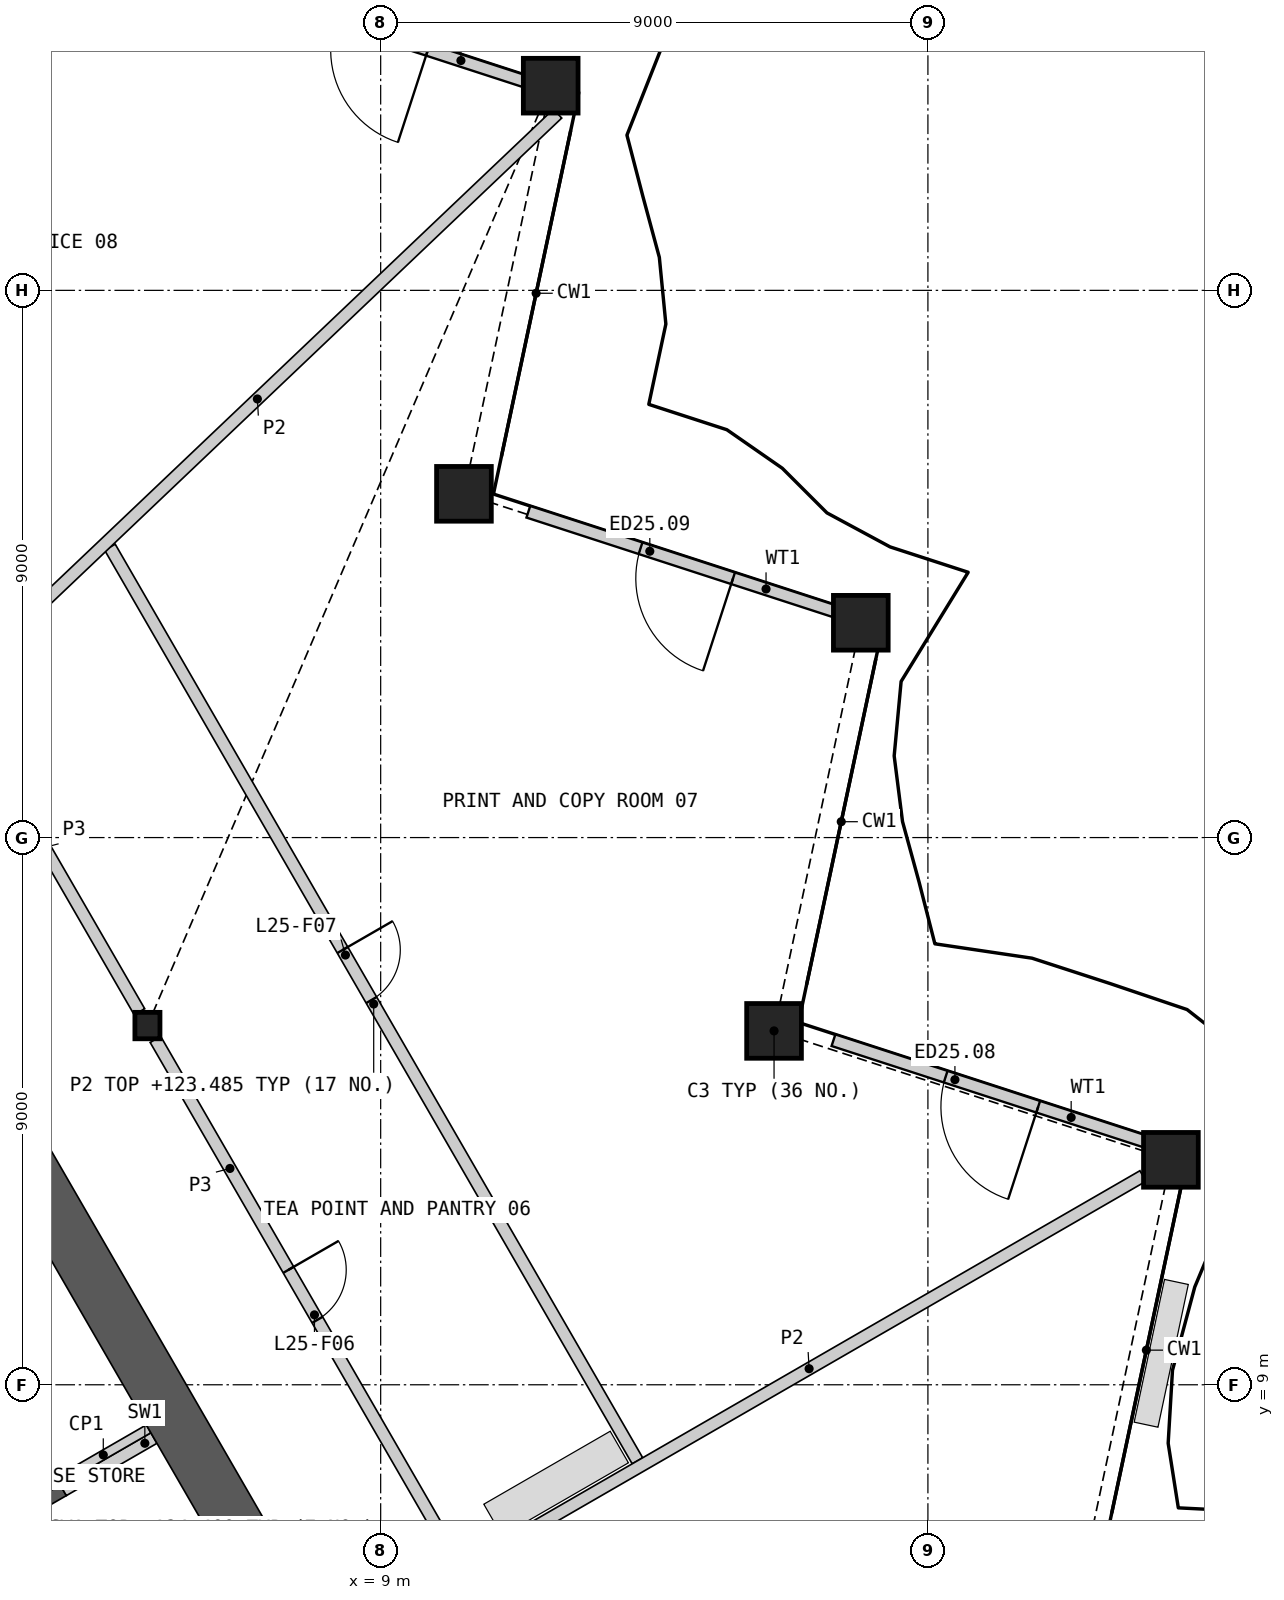
"""IFC4 building model, lengths in metres.
Left out: names, types, materials, properties, quantities, classifications, styles, units other than length and angle.
Written with IfcOpenShell. Run it as: python <this file> out.ifc"""

import sys

from ifc_helpers import new_model, si_unit, direction, frame, frame_2d, origin, origin_2d, place, context, subcontext, project, spatial, polyline, rectangle, hollow_rectangle, i_section, outline, extrude, element, fill, save


model = new_model("IFC4")
c1 = context("Model", 3, precision=1e-05, world=origin(), true_north=direction((0.0, 1.0)))
c2 = subcontext(c1, "Body", "Model", "MODEL_VIEW")
j1 = project(units=[si_unit("LENGTHUNIT", "METRE"), si_unit("PLANEANGLEUNIT", "RADIAN")], contexts=[c1])
p1 = place(None, origin())
s1 = spatial("IfcSite", under=j1, at=p1, CompositionType="ELEMENT")
p2 = place(p1, origin())
s2 = spatial("IfcBuilding", under=s1, at=p2, CompositionType="ELEMENT")
p3 = place(p2, frame((0.0, 0.0, 120.6)))
s3 = spatial("IfcBuildingStorey", under=s2, at=p3, CompositionType="ELEMENT", Elevation=120.6)
for number, where, z_axis, x_axis in (
    (1, (21.996, 12.699, 0.0), (0.0, 0.0, 1.0), (1.0, 0.0, 0.0)),
    (2, (15.469, 14.82, 0.0), (0.0, 0.0, 1.0), (1.0, 0.0, 0.0)),
    (3, (16.896, 21.533, 0.0), (0.0, 0.0, 1.0), (1.0, 0.0, 0.0)),
    (4, (10.37, 23.654, 0.0), (0.0, 0.0, 1.0), (1.0, 0.0, 0.0)),
    (5, (11.796, 30.366, 0.0), (0.0, 0.0, 1.0), (1.0, 0.0, 0.0)),
):
    element("IfcColumn", number, at=place(p3, frame(where, z_axis=z_axis, x_axis=x_axis)), inside=s3, PredefinedType="COLUMN", context=c2, shape_type="SweptSolid", body=[
        extrude(hollow_rectangle(XDim=0.9, YDim=0.9, WallThickness=0.06, at=origin_2d()), origin(), (0.0, 0.0, 1.0), 4.2),
    ])
p4 = place(p3, frame((5.164, 14.908, 0.0), z_axis=(0.0, 0.0, 1.0), x_axis=(1.0, 0.0, 0.0)))
e6 = element("IfcColumn", 6, at=p4, inside=s3, PredefinedType="COLUMN", context=c2, shape_type="SweptSolid", body=[
    extrude(i_section(OverallWidth=0.412, OverallDepth=0.435, WebThickness=0.036, FlangeThickness=0.057, at=origin_2d()), origin(), (0.0, 0.0, 1.0), 4.2),
])
p5 = place(p3, frame((21.659, 12.973, 0.0), z_axis=(0.0, 0.0, 1.0), x_axis=(-0.951065819309, 0.308988361175, 0.0)))
e7 = element("IfcWall", 7, at=p5, inside=s3, PredefinedType="SOLIDWALL", context=c2, shape_type="SweptSolid", body=[
    extrude(rectangle(XDim=5.48, YDim=0.2, at=frame_2d((2.74, 0.0))), origin(), (0.0, 0.0, 1.0), 3.189),
])
p6 = place(p5, frame((1.94, 0.0, 0.0)))
e8 = element("IfcOpeningElement", 8, at=p6, cuts=e7, PredefinedType="OPENING", context=c2, shape_type="SweptSolid", body=[
    extrude(rectangle(XDim=1.6, YDim=2.4, at=frame_2d((0.8, 1.2))), frame((0.0, 0.11, 0.0), z_axis=(0.0, -1.0, 0.0), x_axis=(1.0, 0.0, 0.0)), (0.0, 0.0, 1.0), 0.22),
])
p7 = place(p3, frame((16.641, 21.665, 0.0), z_axis=(0.0, 0.0, 1.0), x_axis=(-0.951052727247, 0.309028655624, 0.0)))
e9 = element("IfcWall", 9, at=p7, inside=s3, PredefinedType="SOLIDWALL", context=c2, shape_type="SweptSolid", body=[
    extrude(rectangle(XDim=5.48, YDim=0.2, at=frame_2d((2.74, 0.0))), origin(), (0.0, 0.0, 1.0), 3.189),
])
p8 = place(p7, frame((1.94, 0.0, 0.0)))
e10 = element("IfcOpeningElement", 10, at=p8, cuts=e9, PredefinedType="OPENING", context=c2, shape_type="SweptSolid", body=[
    extrude(rectangle(XDim=1.6, YDim=2.4, at=frame_2d((0.8, 1.2))), frame((0.0, 0.11, 0.0), z_axis=(0.0, -1.0, 0.0), x_axis=(1.0, 0.0, 0.0)), (0.0, 0.0, 1.0), 0.22),
])
p9 = place(p3, frame((11.623, 30.356, 0.0), z_axis=(0.0, 0.0, 1.0), x_axis=(-0.951052727247, 0.309028655624, 0.0)))
e11 = element("IfcWall", 11, at=p9, inside=s3, PredefinedType="SOLIDWALL", context=c2, shape_type="SweptSolid", body=[
    extrude(rectangle(XDim=5.48, YDim=0.2, at=frame_2d((2.74, 0.0))), origin(), (0.0, 0.0, 1.0), 3.189),
])
p10 = place(p9, frame((1.94, 0.0, 0.0)))
e12 = element("IfcOpeningElement", 12, at=p10, cuts=e11, PredefinedType="OPENING", context=c2, shape_type="SweptSolid", body=[
    extrude(rectangle(XDim=1.6, YDim=2.4, at=frame_2d((0.8, 1.2))), frame((0.0, 0.11, 0.0), z_axis=(0.0, -1.0, 0.0), x_axis=(1.0, 0.0, 0.0)), (0.0, 0.0, 1.0), 0.22),
])
p11 = place(p3, origin())
e13 = element("IfcWall", 13, at=p11, inside=s3, PredefinedType="SHEAR", context=c2, shape_type="SweptSolid", body=[
    extrude(outline(polyline([(1.561, 6.097), (3.731, 7.35), (3.831, 7.177), (1.66, 5.924), (1.561, 6.097)])), origin(), (0.0, 0.0, 1.0), 3.8),
])
p12 = place(p3, frame((3.781, 7.263, 0.0), z_axis=(0.0, 0.0, 1.0), x_axis=(0.865963414263, 0.500107353632, 0.0)))
e14 = element("IfcWall", 14, at=p12, inside=s3, PredefinedType="SHEAR", context=c2, shape_type="SweptSolid", body=[
    extrude(rectangle(XDim=1.72, YDim=0.2, at=frame_2d((0.86, 0.0))), origin(), (0.0, 0.0, 1.0), 3.8),
])
p13 = place(p3, frame((3.693, 7.415, 0.0), z_axis=(0.0, 0.0, 1.0), x_axis=(0.866024871741, 0.500000921525, 0.0)))
e15 = element("IfcWall", 15, at=p13, inside=s3, PredefinedType="PARTITIONING", context=c2, shape_type="SweptSolid", body=[
    extrude(rectangle(XDim=1.72, YDim=0.15, at=frame_2d((0.86, 0.0))), origin(), (0.0, 0.0, 1.0), 3.8),
])
p14 = place(p3, frame((7.91, 4.451, 0.0), z_axis=(0.0, 0.0, 1.0), x_axis=(-0.500005799286, 0.866022055539, 0.0)))
e16 = element("IfcWall", 16, at=p14, inside=s3, PredefinedType="SHEAR", context=c2, shape_type="SweptSolid", body=[
    extrude(rectangle(XDim=15.041, YDim=0.9, at=frame_2d((7.521, 0.0))), origin(), (0.0, 0.0, 1.0), 3.8),
])
p15 = place(p3, frame((5.295, 14.68, 0.0), z_axis=(0.0, 0.0, 1.0), x_axis=(0.500012035596, -0.866018454918, 0.0)))
e17 = element("IfcWall", 17, at=p15, inside=s3, PredefinedType="PARTITIONING", context=c2, shape_type="SweptSolid", body=[
    extrude(rectangle(XDim=9.803, YDim=0.2, at=frame_2d((4.902, 0.0))), origin(), (0.0, 0.0, 1.0), 3.8),
])
p16 = place(p15, frame((4.376, 0.0, 0.0)))
e18 = element("IfcOpeningElement", 18, at=p16, cuts=e17, PredefinedType="OPENING", context=c2, shape_type="SweptSolid", body=[
    extrude(rectangle(XDim=0.95, YDim=2.1, at=frame_2d((0.475, 1.05))), frame((0.0, 0.11, 0.0), z_axis=(0.0, -1.0, 0.0), x_axis=(1.0, 0.0, 0.0)), (0.0, 0.0, 1.0), 0.22),
])
p17 = place(p3, frame((1.913, 20.539, 0.0), z_axis=(0.0, 0.0, 1.0), x_axis=(0.499980978912, -0.866036385336, 0.0)))
e19 = element("IfcWall", 19, at=p17, inside=s3, PredefinedType="PARTITIONING", context=c2, shape_type="SweptSolid", body=[
    extrude(rectangle(XDim=6.24, YDim=0.2, at=frame_2d((3.12, 0.0))), origin(), (0.0, 0.0, 1.0), 3.8),
])
p18 = place(p3, frame((4.548, 22.775, 0.0), z_axis=(0.0, 0.0, 1.0), x_axis=(0.499999764473, -0.866025539766, 0.0)))
e20 = element("IfcWall", 20, at=p18, inside=s3, PredefinedType="PARTITIONING", context=c2, shape_type="SweptSolid", body=[
    extrude(rectangle(XDim=17.35, YDim=0.2, at=frame_2d((8.675, 0.0))), origin(), (0.0, 0.0, 1.0), 2.885),
])
p19 = place(p18, frame((7.65, 0.0, 0.0)))
e21 = element("IfcOpeningElement", 21, at=p19, cuts=e20, PredefinedType="OPENING", context=c2, shape_type="SweptSolid", body=[
    extrude(rectangle(XDim=0.95, YDim=2.1, at=frame_2d((0.475, 1.05))), frame((0.0, 0.11, 0.0), z_axis=(0.0, -1.0, 0.0), x_axis=(1.0, 0.0, 0.0)), (0.0, 0.0, 1.0), 0.22),
])
p20 = place(p3, frame((2.035, 20.521, 0.0), z_axis=(0.0, 0.0, 1.0), x_axis=(0.724819524984, 0.688938789881, 0.0)))
e22 = element("IfcWall", 22, at=p20, inside=s3, PredefinedType="PARTITIONING", context=c2, shape_type="SweptSolid", body=[
    extrude(rectangle(XDim=13.622, YDim=0.2, at=frame_2d((6.811, 0.0))), origin(), (0.0, 0.0, 1.0), 2.885),
])
p21 = place(p3, frame((10.556, 6.094, 0.0), z_axis=(0.0, 0.0, 1.0), x_axis=(0.86602461759, 0.500001361726, 0.0)))
e23 = element("IfcWall", 23, at=p21, inside=s3, PredefinedType="PARTITIONING", context=c2, shape_type="SweptSolid", body=[
    extrude(rectangle(XDim=12.679, YDim=0.2, at=frame_2d((6.34, 0.0))), origin(), (0.0, 0.0, 1.0), 2.885),
])
p22 = place(p6, origin())
e24 = element("IfcDoor", 24, at=p22, inside=s3, OperationType="DOUBLE_DOOR_SINGLE_SWING", PredefinedType="DOOR", context=c2, shape_type="SweptSolid", body=[
    extrude(rectangle(XDim=1.6, YDim=2.4, at=frame_2d((0.8, 1.2))), frame((0.0, 0.025, 0.0), z_axis=(0.0, -1.0, 0.0), x_axis=(1.0, 0.0, 0.0)), (0.0, 0.0, 1.0), 0.05),
])
fill(e8, e24)
p23 = place(p8, origin())
e25 = element("IfcDoor", 25, at=p23, inside=s3, OperationType="DOUBLE_DOOR_SINGLE_SWING", PredefinedType="DOOR", context=c2, shape_type="SweptSolid", body=[
    extrude(rectangle(XDim=1.6, YDim=2.4, at=frame_2d((0.8, 1.2))), frame((0.0, 0.025, 0.0), z_axis=(0.0, -1.0, 0.0), x_axis=(1.0, 0.0, 0.0)), (0.0, 0.0, 1.0), 0.05),
])
fill(e10, e25)
p24 = place(p16, origin())
e26 = element("IfcDoor", 26, at=p24, inside=s3, OperationType="SINGLE_SWING_LEFT", PredefinedType="DOOR", context=c2, shape_type="SweptSolid", body=[
    extrude(rectangle(XDim=0.95, YDim=2.1, at=frame_2d((0.475, 1.05))), frame((0.0, 0.025, 0.0), z_axis=(0.0, -1.0, 0.0), x_axis=(1.0, 0.0, 0.0)), (0.0, 0.0, 1.0), 0.05),
])
fill(e18, e26)
p25 = place(p19, origin())
e27 = element("IfcDoor", 27, at=p25, inside=s3, OperationType="SINGLE_SWING_LEFT", PredefinedType="DOOR", context=c2, shape_type="SweptSolid", body=[
    extrude(rectangle(XDim=0.95, YDim=2.1, at=frame_2d((0.475, 1.05))), frame((0.0, 0.025, 0.0), z_axis=(0.0, -1.0, 0.0), x_axis=(1.0, 0.0, 0.0)), (0.0, 0.0, 1.0), 0.05),
])
fill(e21, e27)
save(model, sys.argv[1])
